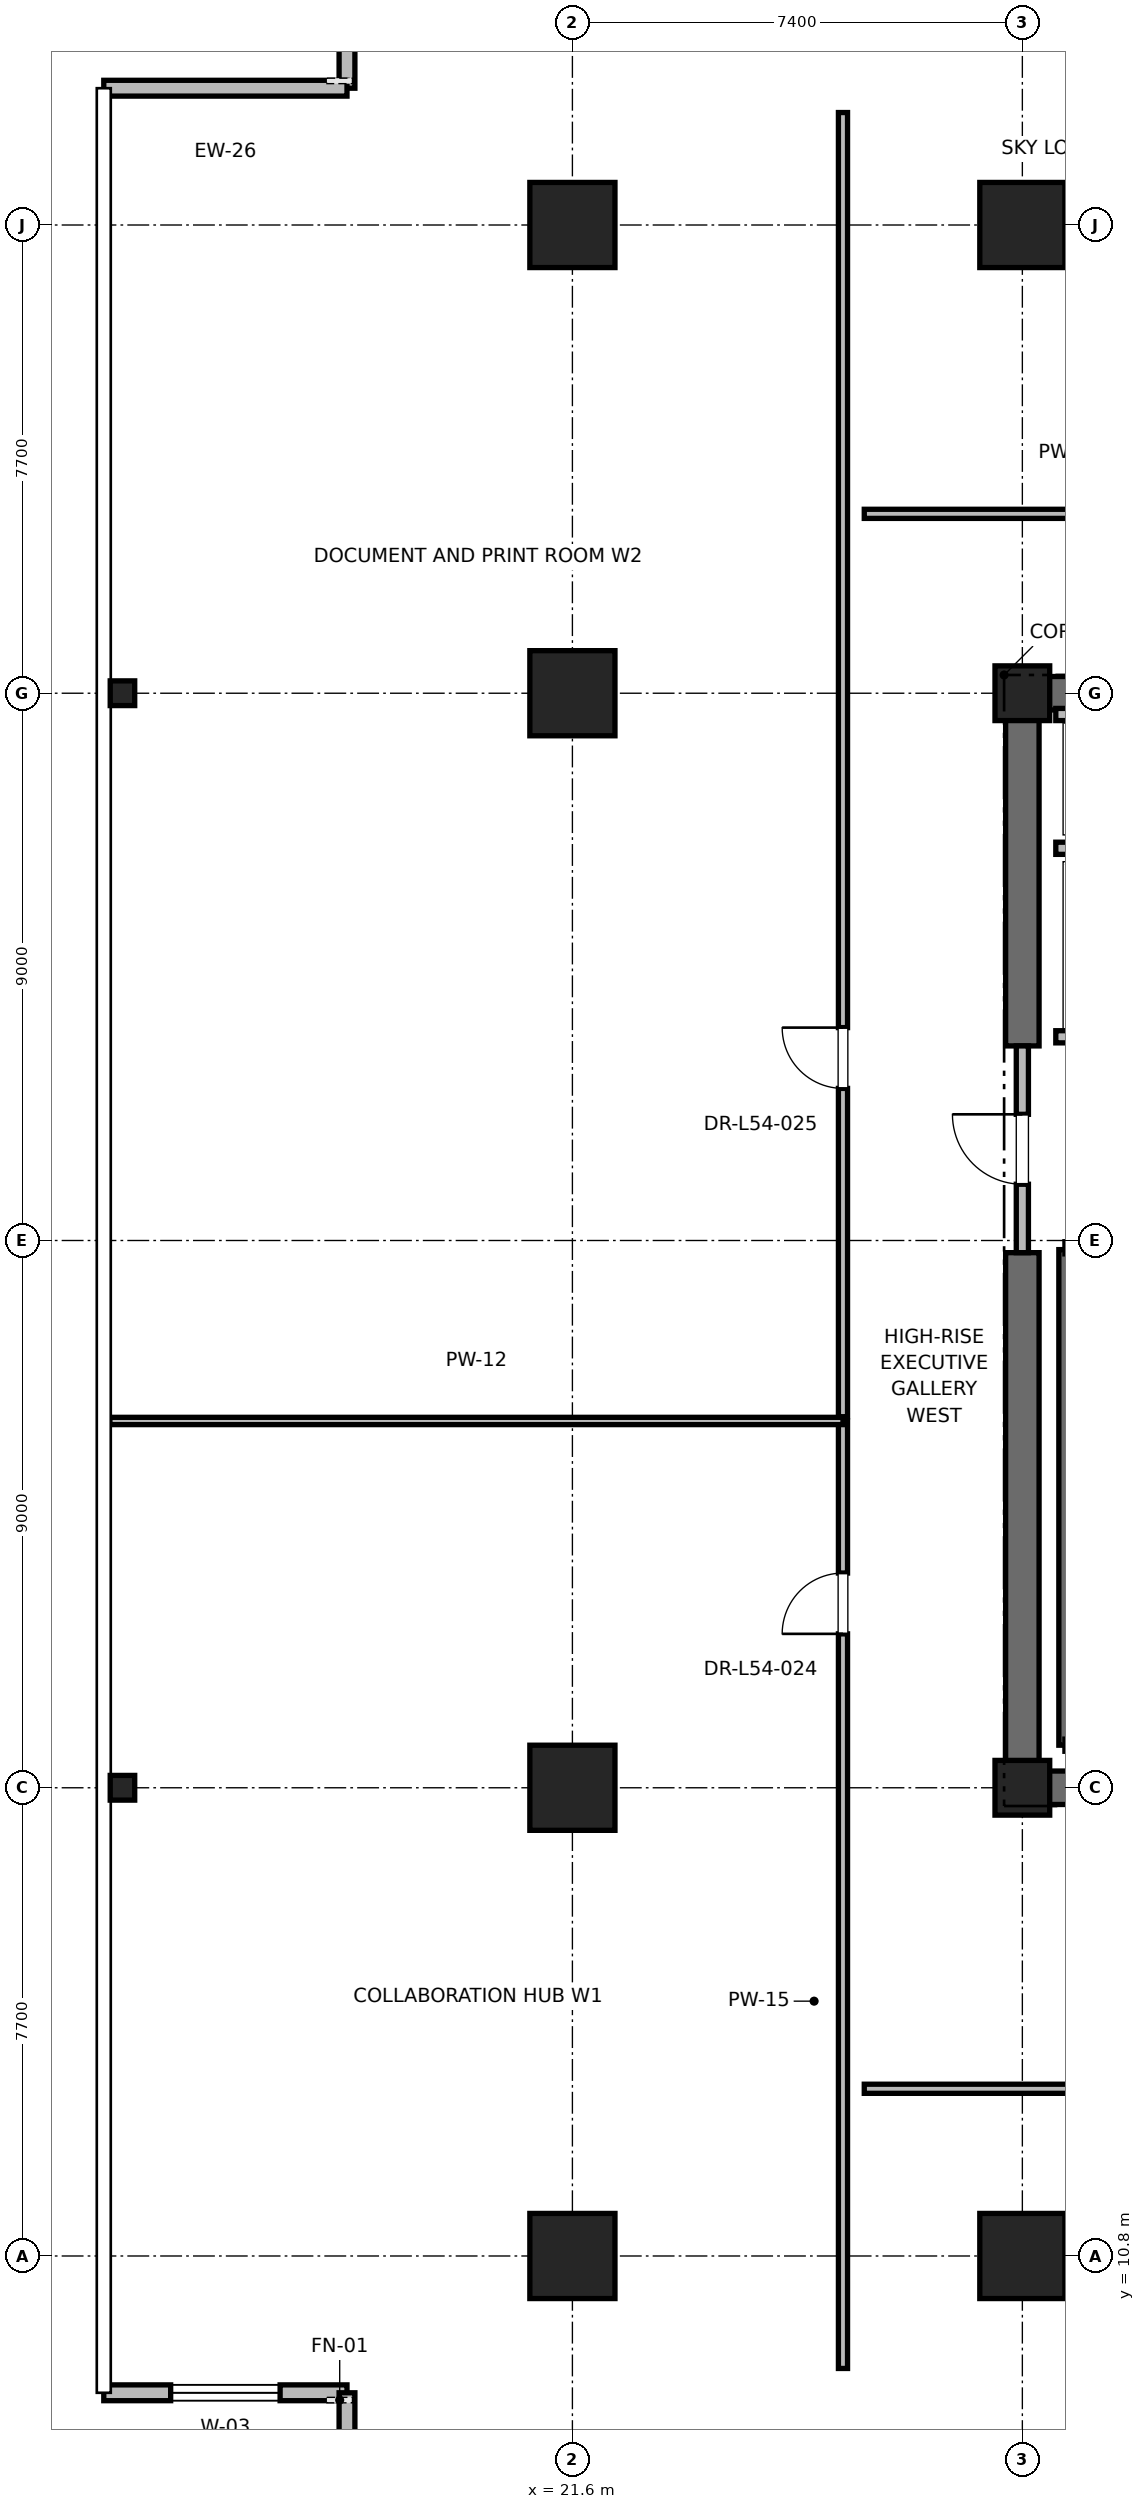
"""IFC4 building model, lengths in metres.
Left out: names, types, materials, properties, quantities, classifications, styles, units other than length and angle.
Written with IfcOpenShell. Run it as: python <this file> out.ifc"""

import sys

from ifc_helpers import new_model, si_unit, direction, frame, frame_2d, origin, origin_2d, place, context, subcontext, project, spatial, rectangle, i_section, extrude, element, fill, save


model = new_model("IFC4")
c1 = context("Model", 3, precision=1e-05, world=origin(), true_north=direction((0.0, 1.0)))
c2 = subcontext(c1, "Body", "Model", "MODEL_VIEW")
j1 = project(units=[si_unit("LENGTHUNIT", "METRE"), si_unit("PLANEANGLEUNIT", "RADIAN")], contexts=[c1])
p1 = place(None, origin())
s1 = spatial("IfcSite", under=j1, at=p1, CompositionType="ELEMENT")
p2 = place(p1, origin())
s2 = spatial("IfcBuilding", under=s1, at=p2, CompositionType="ELEMENT")
p3 = place(p2, frame((0.0, 0.0, 233.2)))
s3 = spatial("IfcBuildingStorey", under=s2, at=p3, CompositionType="ELEMENT", Elevation=233.2)
for number, where, z_axis, x_axis in (
    (1, (29.0, 10.8, 0.0), (0.0, 0.0, 1.0), (1.0, 0.0, 0.0)),
    (2, (29.0, 44.2, 0.0), (0.0, 0.0, 1.0), (1.0, 0.0, 0.0)),
    (3, (21.6, 18.5, 0.0), (0.0, 0.0, 1.0), (1.0, 0.0, 0.0)),
    (4, (21.6, 36.5, 0.0), (0.0, 0.0, 1.0), (1.0, 0.0, 0.0)),
    (5, (21.6, 10.8, 0.0), (0.0, 0.0, 1.0), (1.0, 0.0, 0.0)),
    (6, (21.6, 44.2, 0.0), (0.0, 0.0, 1.0), (1.0, 0.0, 0.0)),
):
    element("IfcColumn", number, at=place(p3, frame(where, z_axis=z_axis, x_axis=x_axis)), inside=s3, PredefinedType="COLUMN", context=c2, shape_type="SweptSolid", body=[
        extrude(rectangle(XDim=1.4, YDim=1.4, at=origin_2d()), origin(), (0.0, 0.0, 1.0), 5.0),
    ])
for number, where, z_axis, x_axis in (
    (7, (14.2, 18.5, 0.0), (0.0, 0.0, 1.0), (1.0, 0.0, 0.0)),
    (8, (14.2, 36.5, 0.0), (0.0, 0.0, 1.0), (1.0, 0.0, 0.0)),
):
    element("IfcColumn", number, at=place(p3, frame(where, z_axis=z_axis, x_axis=x_axis)), inside=s3, PredefinedType="COLUMN", context=c2, shape_type="SweptSolid", body=[
        extrude(i_section(OverallWidth=0.403, OverallDepth=0.406, WebThickness=0.027, FlangeThickness=0.043, FilletRadius=0.015, at=origin_2d()), origin(), (0.0, 0.0, 1.0), 5.0),
    ])
for number, where, z_axis, x_axis in (
    (9, (29.0, 18.5, 0.0), (0.0, 0.0, 1.0), (1.0, 0.0, 0.0)),
    (10, (29.0, 36.5, 0.0), (0.0, 0.0, 1.0), (1.0, 0.0, 0.0)),
):
    element("IfcColumn", number, at=place(p3, frame(where, z_axis=z_axis, x_axis=x_axis)), inside=s3, PredefinedType="PILASTER", context=c2, shape_type="SweptSolid", body=[
        extrude(rectangle(XDim=0.9, YDim=0.9, at=origin_2d()), origin(), (0.0, 0.0, 1.0), 5.0),
    ])
p4 = place(p3, frame((29.0, 18.5, 0.0), z_axis=(0.0, 0.0, 1.0), x_axis=(1.0, 0.0, 0.0)))
e11 = element("IfcWall", 11, at=p4, inside=s3, PredefinedType="SHEAR", context=c2, shape_type="SweptSolid", body=[
    extrude(rectangle(XDim=9.2, YDim=0.55, at=frame_2d((4.6, 0.0))), origin(), (0.0, 0.0, 1.0), 4.7),
])
p5 = place(p3, frame((29.0, 36.5, 0.0), z_axis=(0.0, 0.0, 1.0), x_axis=(1.0, 0.0, 0.0)))
e12 = element("IfcWall", 12, at=p5, inside=s3, PredefinedType="SHEAR", context=c2, shape_type="SweptSolid", body=[
    extrude(rectangle(XDim=5.8, YDim=0.55, at=frame_2d((2.9, 0.0))), origin(), (0.0, 0.0, 1.0), 4.7),
])
p6 = place(p3, frame((29.0, 18.5, 0.0), z_axis=(0.0, 0.0, 1.0), x_axis=(0.0, 1.0, 0.0)))
e13 = element("IfcWall", 13, at=p6, inside=s3, PredefinedType="SHEAR", context=c2, shape_type="SweptSolid", body=[
    extrude(rectangle(XDim=8.8, YDim=0.55, at=frame_2d((4.4, 0.0))), origin(), (0.0, 0.0, 1.0), 4.7),
])
p7 = place(p3, frame((29.0, 30.7, 0.0), z_axis=(0.0, 0.0, 1.0), x_axis=(0.0, 1.0, 0.0)))
e14 = element("IfcWall", 14, at=p7, inside=s3, PredefinedType="SHEAR", context=c2, shape_type="SweptSolid", body=[
    extrude(rectangle(XDim=5.8, YDim=0.55, at=frame_2d((2.9, 0.0))), origin(), (0.0, 0.0, 1.0), 4.7),
])
p8 = place(p3, frame((13.893, 8.55, 0.0), z_axis=(0.0, 0.0, 1.0), x_axis=(1.0, 0.0, 0.0)))
e15 = element("IfcWall", 15, at=p8, inside=s3, PredefinedType="PARAPET", context=c2, shape_type="SweptSolid", body=[
    extrude(rectangle(XDim=4.0, YDim=0.26, at=frame_2d((2.0, 0.0))), origin(), (0.0, 0.0, 1.0), 4.7),
])
p9 = place(p8, frame((1.1, 0.0, 0.85)))
e16 = element("IfcOpeningElement", 16, at=p9, cuts=e15, PredefinedType="OPENING", context=c2, shape_type="SweptSolid", body=[
    extrude(rectangle(XDim=1.8, YDim=2.2, at=frame_2d((0.9, 1.1))), frame((0.0, 0.13, 0.0), z_axis=(0.0, -1.0, 0.0), x_axis=(1.0, 0.0, 0.0)), (0.0, 0.0, 1.0), 0.26),
])
p10 = place(p3, frame((17.893, 8.55, 0.0), z_axis=(0.0, 0.0, 1.0), x_axis=(0.0, -1.0, 0.0)))
e17 = element("IfcWall", 17, at=p10, inside=s3, PredefinedType="PARAPET", context=c2, shape_type="SweptSolid", body=[
    extrude(rectangle(XDim=3.5, YDim=0.26, at=frame_2d((1.75, 0.0))), origin(), (0.0, 0.0, 1.0), 4.7),
])
p11 = place(p3, frame((17.893, 49.95, 0.0), z_axis=(0.0, 0.0, 1.0), x_axis=(0.0, -1.0, 0.0)))
e18 = element("IfcWall", 18, at=p11, inside=s3, PredefinedType="PARAPET", context=c2, shape_type="SweptSolid", body=[
    extrude(rectangle(XDim=3.5, YDim=0.26, at=frame_2d((1.75, 0.0))), origin(), (0.0, 0.0, 1.0), 4.7),
])
p12 = place(p11, frame((0.85, 0.0, 0.85)))
e19 = element("IfcOpeningElement", 19, at=p12, cuts=e18, PredefinedType="OPENING", context=c2, shape_type="SweptSolid", body=[
    extrude(rectangle(XDim=1.8, YDim=2.2, at=frame_2d((0.9, 1.1))), frame((0.0, 0.13, 0.0), z_axis=(0.0, -1.0, 0.0), x_axis=(1.0, 0.0, 0.0)), (0.0, 0.0, 1.0), 0.26),
])
p13 = place(p3, frame((17.893, 46.45, 0.0), z_axis=(0.0, 0.0, 1.0), x_axis=(-1.0, 0.0, 0.0)))
e20 = element("IfcWall", 20, at=p13, inside=s3, PredefinedType="PARAPET", context=c2, shape_type="SweptSolid", body=[
    extrude(rectangle(XDim=4.0, YDim=0.26, at=frame_2d((2.0, 0.0))), origin(), (0.0, 0.0, 1.0), 4.7),
])
p14 = place(p3, frame((29.7, 19.2, 0.0), z_axis=(0.0, 0.0, 1.0), x_axis=(0.0, 1.0, 0.0)))
e21 = element("IfcWall", 21, at=p14, inside=s3, PredefinedType="SOLIDWALL", context=c2, shape_type="SweptSolid", body=[
    extrude(rectangle(XDim=8.15, YDim=0.2, at=frame_2d((4.075, 0.0))), origin(), (0.0, 0.0, 1.0), 4.7),
])
p15 = place(p3, frame((29.0, 27.3, 0.0), z_axis=(0.0, 0.0, 1.0), x_axis=(0.0, 1.0, 0.0)))
e22 = element("IfcWall", 22, at=p15, inside=s3, PredefinedType="PARTITIONING", context=c2, shape_type="SweptSolid", body=[
    extrude(rectangle(XDim=3.4, YDim=0.2, at=frame_2d((1.7, 0.0))), origin(), (0.0, 0.0, 1.0), 3.68),
])
p16 = place(p15, frame((1.125, 0.0, 0.0)))
e23 = element("IfcOpeningElement", 23, at=p16, cuts=e22, PredefinedType="OPENING", context=c2, shape_type="SweptSolid", body=[
    extrude(rectangle(XDim=1.15, YDim=2.2, at=frame_2d((0.575, 1.1))), frame((0.0, 0.1, 0.0), z_axis=(0.0, -1.0, 0.0), x_axis=(1.0, 0.0, 0.0)), (0.0, 0.0, 1.0), 0.2),
])
p17 = place(p3, frame((29.55, 30.85, 0.0), z_axis=(0.0, 0.0, 1.0), x_axis=(1.0, 0.0, 0.0)))
e24 = element("IfcWall", 24, at=p17, inside=s3, PredefinedType="SOLIDWALL", context=c2, shape_type="SweptSolid", body=[
    extrude(rectangle(XDim=2.6, YDim=0.2, at=frame_2d((1.3, 0.0))), origin(), (0.0, 0.0, 1.0), 3.68),
])
p18 = place(p17, frame((0.75, 0.0, 0.0)))
e25 = element("IfcOpeningElement", 25, at=p18, cuts=e24, PredefinedType="OPENING", context=c2, shape_type="SweptSolid", body=[
    extrude(rectangle(XDim=1.1, YDim=2.2, at=frame_2d((0.55, 1.1))), frame((0.0, 0.1, 0.0), z_axis=(0.0, -1.0, 0.0), x_axis=(1.0, 0.0, 0.0)), (0.0, 0.0, 1.0), 0.2),
])
p19 = place(p3, frame((29.55, 33.95, 0.0), z_axis=(0.0, 0.0, 1.0), x_axis=(1.0, 0.0, 0.0)))
e26 = element("IfcWall", 26, at=p19, inside=s3, PredefinedType="SOLIDWALL", context=c2, shape_type="SweptSolid", body=[
    extrude(rectangle(XDim=2.8, YDim=0.2, at=frame_2d((1.4, 0.0))), origin(), (0.0, 0.0, 1.0), 4.7),
])
p20 = place(p3, frame((32.35, 36.15, 0.0), z_axis=(0.0, 0.0, 1.0), x_axis=(-1.0, 0.0, 0.0)))
e27 = element("IfcWall", 27, at=p20, inside=s3, PredefinedType="SOLIDWALL", context=c2, shape_type="SweptSolid", body=[
    extrude(rectangle(XDim=2.8, YDim=0.2, at=frame_2d((1.4, 0.0))), origin(), (0.0, 0.0, 1.0), 3.987),
])
p21 = place(p3, frame((26.4, 39.45, 0.0), z_axis=(0.0, 0.0, 1.0), x_axis=(1.0, 0.0, 0.0)))
e28 = element("IfcWall", 28, at=p21, inside=s3, PredefinedType="PARTITIONING", context=c2, shape_type="SweptSolid", body=[
    extrude(rectangle(XDim=14.96, YDim=0.15, at=frame_2d((7.48, 0.0))), origin(), (0.0, 0.0, 1.0), 2.85),
])
p22 = place(p21, frame((6.745, 0.0, 0.0)))
e29 = element("IfcOpeningElement", 29, at=p22, cuts=e28, PredefinedType="OPENING", context=c2, shape_type="SweptSolid", body=[
    extrude(rectangle(XDim=1.5, YDim=2.25, at=frame_2d((0.75, 1.125))), frame((0.0, 0.075, 0.0), z_axis=(0.0, -1.0, 0.0), x_axis=(1.0, 0.0, 0.0)), (0.0, 0.0, 1.0), 0.15),
])
p23 = place(p3, frame((26.4, 13.55, 0.0), z_axis=(0.0, 0.0, 1.0), x_axis=(1.0, 0.0, 0.0)))
e30 = element("IfcWall", 30, at=p23, inside=s3, PredefinedType="PARTITIONING", context=c2, shape_type="SweptSolid", body=[
    extrude(rectangle(XDim=27.2, YDim=0.15, at=frame_2d((13.6, 0.0))), origin(), (0.0, 0.0, 1.0), 2.85),
])
p24 = place(p23, frame((13.1, 0.0, 0.0)))
e31 = element("IfcOpeningElement", 31, at=p24, cuts=e30, PredefinedType="OPENING", context=c2, shape_type="SweptSolid", body=[
    extrude(rectangle(XDim=1.0, YDim=2.15, at=frame_2d((0.5, 1.075))), frame((0.0, 0.075, 0.0), z_axis=(0.0, -1.0, 0.0), x_axis=(1.0, 0.0, 0.0)), (0.0, 0.0, 1.0), 0.15),
])
p25 = place(p3, frame((26.05, 8.95, 0.0), z_axis=(0.0, 0.0, 1.0), x_axis=(0.0, 1.0, 0.0)))
e32 = element("IfcWall", 32, at=p25, inside=s3, PredefinedType="PARTITIONING", context=c2, shape_type="SweptSolid", body=[
    extrude(rectangle(XDim=15.582, YDim=0.15, at=frame_2d((7.791, 0.0))), origin(), (0.0, 0.0, 1.0), 2.85),
])
p26 = place(p25, frame((12.081, 0.0, 0.0)))
e33 = element("IfcOpeningElement", 33, at=p26, cuts=e32, PredefinedType="OPENING", context=c2, shape_type="SweptSolid", body=[
    extrude(rectangle(XDim=1.0, YDim=2.15, at=frame_2d((0.5, 1.075))), frame((0.0, 0.075, 0.0), z_axis=(0.0, -1.0, 0.0), x_axis=(1.0, 0.0, 0.0)), (0.0, 0.0, 1.0), 0.15),
])
p27 = place(p3, frame((13.993, 24.532, 0.0), z_axis=(0.0, 0.0, 1.0), x_axis=(1.0, 0.0, 0.0)))
e34 = element("IfcWall", 34, at=p27, inside=s3, PredefinedType="PARTITIONING", context=c2, shape_type="SweptSolid", body=[
    extrude(rectangle(XDim=12.057, YDim=0.12, at=frame_2d((6.029, 0.0))), origin(), (0.0, 0.0, 1.0), 2.85),
])
p28 = place(p3, frame((26.05, 24.602, 0.0), z_axis=(0.0, 0.0, 1.0), x_axis=(0.0, 1.0, 0.0)))
e35 = element("IfcWall", 35, at=p28, inside=s3, PredefinedType="PARTITIONING", context=c2, shape_type="SweptSolid", body=[
    extrude(rectangle(XDim=21.448, YDim=0.15, at=frame_2d((10.724, 0.0))), origin(), (0.0, 0.0, 1.0), 2.85),
])
p29 = place(p28, frame((5.399, 0.0, 0.0)))
e36 = element("IfcOpeningElement", 36, at=p29, cuts=e35, PredefinedType="OPENING", context=c2, shape_type="SweptSolid", body=[
    extrude(rectangle(XDim=1.0, YDim=2.15, at=frame_2d((0.5, 1.075))), frame((0.0, 0.075, 0.0), z_axis=(0.0, -1.0, 0.0), x_axis=(1.0, 0.0, 0.0)), (0.0, 0.0, 1.0), 0.15),
])
p30 = place(p9, origin())
e37 = element("IfcWindow", 37, at=p30, inside=s3, PartitioningType="SINGLE_PANEL", PredefinedType="WINDOW", context=c2, shape_type="SweptSolid", body=[
    extrude(rectangle(XDim=1.8, YDim=2.2, at=frame_2d((0.9, 1.1))), frame((0.0, 0.03, 0.0), z_axis=(0.0, -1.0, 0.0), x_axis=(1.0, 0.0, 0.0)), (0.0, 0.0, 1.0), 0.06),
])
fill(e16, e37)
p31 = place(p16, origin())
e38 = element("IfcDoor", 38, at=p31, inside=s3, OperationType="SINGLE_SWING_RIGHT", PredefinedType="DOOR", context=c2, shape_type="SweptSolid", body=[
    extrude(rectangle(XDim=1.15, YDim=2.2, at=frame_2d((0.575, 1.1))), frame((0.0, 0.025, 0.0), z_axis=(0.0, -1.0, 0.0), x_axis=(1.0, 0.0, 0.0)), (0.0, 0.0, 1.0), 0.05),
])
fill(e23, e38)
p32 = place(p26, origin())
e39 = element("IfcDoor", 39, at=p32, inside=s3, OperationType="SINGLE_SWING_LEFT", PredefinedType="DOOR", context=c2, shape_type="SweptSolid", body=[
    extrude(rectangle(XDim=1.0, YDim=2.15, at=frame_2d((0.5, 1.075))), frame((0.0, 0.025, 0.0), z_axis=(0.0, -1.0, 0.0), x_axis=(1.0, 0.0, 0.0)), (0.0, 0.0, 1.0), 0.05),
])
fill(e33, e39)
p33 = place(p29, origin())
e40 = element("IfcDoor", 40, at=p33, inside=s3, OperationType="SINGLE_SWING_RIGHT", PredefinedType="DOOR", context=c2, shape_type="SweptSolid", body=[
    extrude(rectangle(XDim=1.0, YDim=2.15, at=frame_2d((0.5, 1.075))), frame((0.0, 0.025, 0.0), z_axis=(0.0, -1.0, 0.0), x_axis=(1.0, 0.0, 0.0)), (0.0, 0.0, 1.0), 0.05),
])
fill(e36, e40)
save(model, sys.argv[1])
